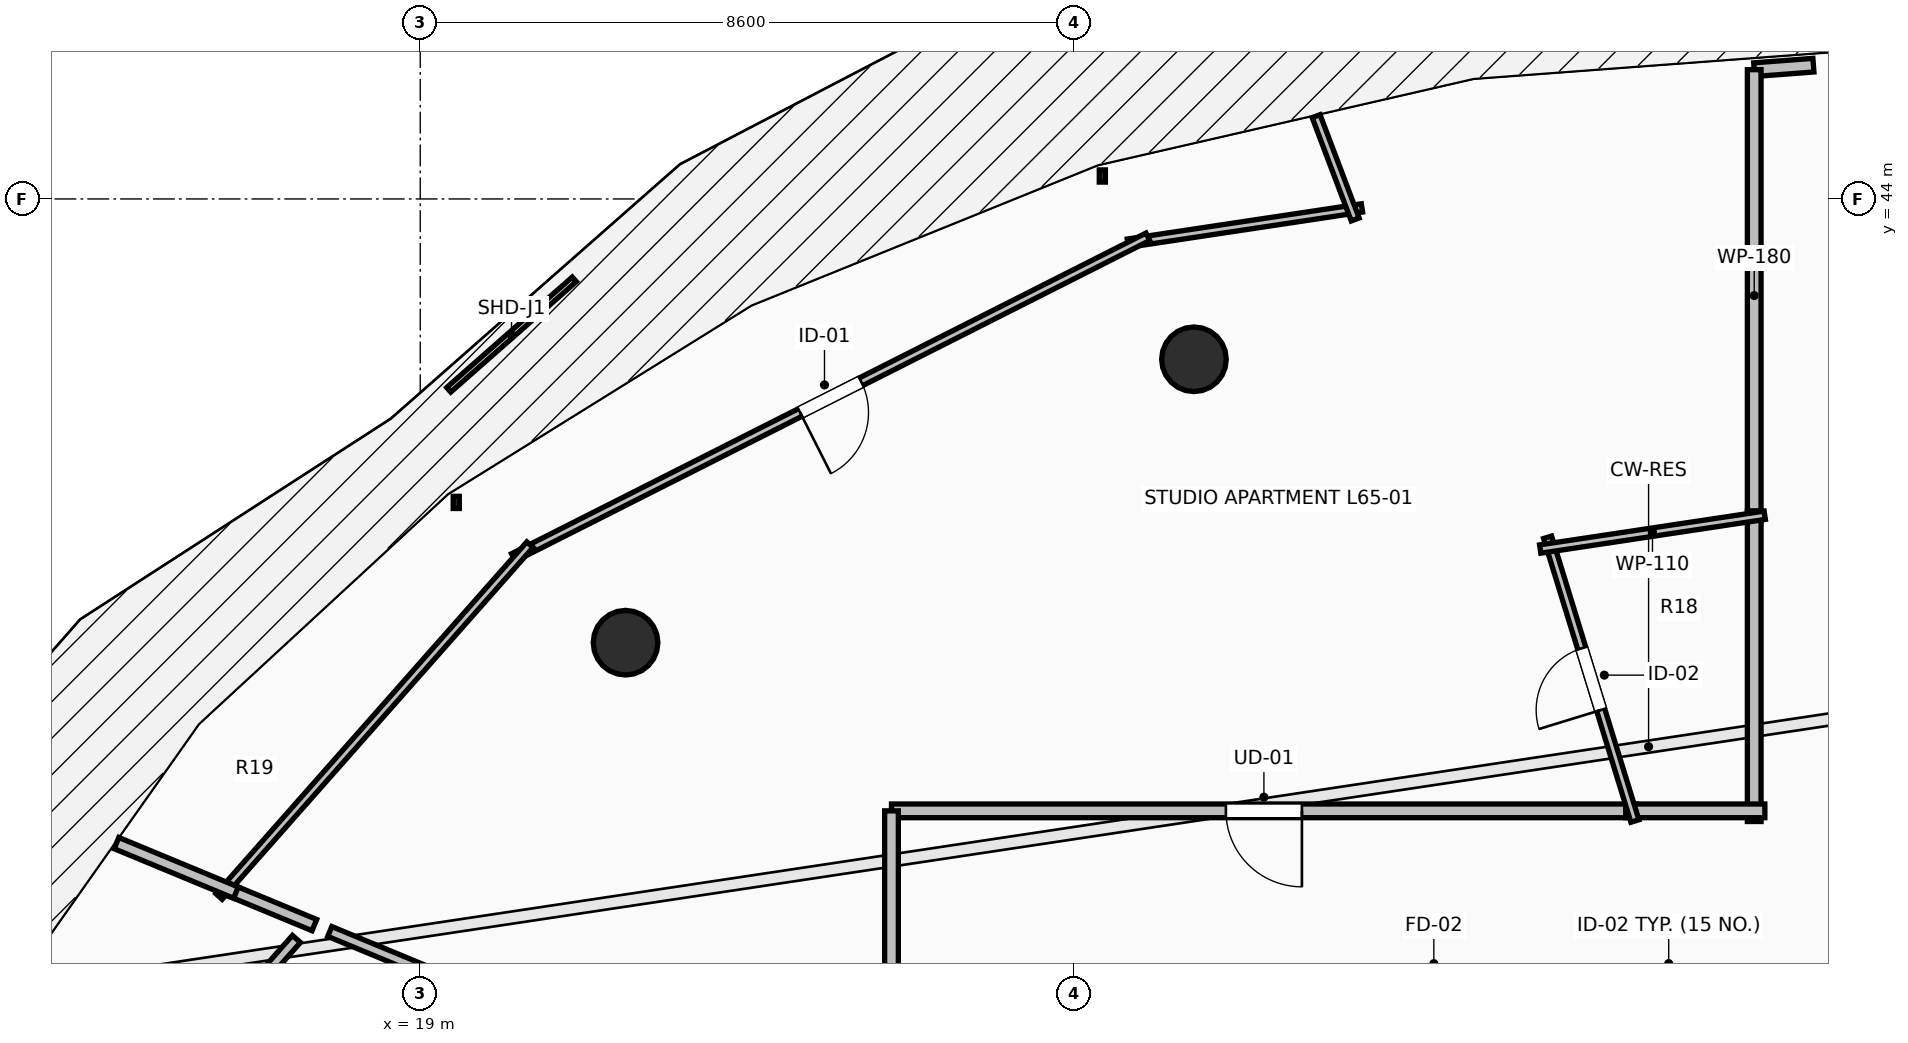
"""IFC4 building model, lengths in metres.
Left out: names, types, materials, properties, quantities, classifications, styles, units other than length and angle.
Written with IfcOpenShell. Run it as: python <this file> out.ifc"""

import sys

from ifc_helpers import new_model, si_unit, direction, frame, frame_2d, origin, origin_2d, place, context, subcontext, project, spatial, rectangle, circle, extrude, element, fill, save


model = new_model("IFC4")
c1 = context("Model", 3, precision=1e-05, world=origin(), true_north=direction((0.0, 1.0)))
c2 = subcontext(c1, "Body", "Model", "MODEL_VIEW")
j1 = project(units=[si_unit("LENGTHUNIT", "METRE"), si_unit("PLANEANGLEUNIT", "RADIAN")], contexts=[c1])
p1 = place(None, origin())
s1 = spatial("IfcSite", under=j1, at=p1, CompositionType="ELEMENT")
p2 = place(p1, origin())
s2 = spatial("IfcBuilding", under=s1, at=p2, CompositionType="ELEMENT")
p3 = place(p2, frame((0.0, 0.0, 241.35)))
s3 = spatial("IfcBuildingStorey", under=s2, at=p3, CompositionType="ELEMENT", Elevation=241.35)
for number, where, z_axis, x_axis in (
    (1, (29.179, 41.891, 0.0), (0.0, 0.0, 1.0), (-0.383, 0.924, 0.0)),
    (2, (21.701, 38.162, 0.0), (0.0, 0.0, 1.0), (-0.707, 0.707, 0.0)),
):
    element("IfcColumn", number, at=place(p3, frame(where, z_axis=z_axis, x_axis=x_axis)), inside=s3, PredefinedType="COLUMN", context=c2, shape_type="SweptSolid", body=[
        extrude(circle(Radius=0.425, at=origin_2d()), origin(), (0.0, 0.0, 1.0), 3.55),
    ])
p4 = place(p3, frame((37.329, 45.76, 0.0), z_axis=(0.0, 0.0, 1.0), x_axis=(-0.997136622012, -0.0756211415, 0.0)))
e3 = element("IfcWall", 3, at=p4, inside=s3, PredefinedType="PARTITIONING", context=c2, shape_type="SweptSolid", body=[
    extrude(rectangle(XDim=0.781, YDim=0.18, at=frame_2d((0.391, 0.0))), origin(), (0.0, 0.0, 1.0), 3.29),
])
p5 = place(p3, frame((36.55, 45.701, 0.0), z_axis=(0.0, 0.0, 1.0), x_axis=(0.0, -1.0, 0.0)))
e4 = element("IfcWall", 4, at=p5, inside=s3, PredefinedType="PARTITIONING", context=c2, shape_type="SweptSolid", body=[
    extrude(rectangle(XDim=5.944, YDim=0.18, at=frame_2d((2.972, 0.0))), origin(), (0.0, 0.0, 1.0), 2.482),
])
p6 = place(p3, frame((34.999, 35.95, 0.0), z_axis=(0.0, 0.0, 1.0), x_axis=(-1.0, 0.0, 0.0)))
e5 = element("IfcWall", 5, at=p6, inside=s3, PredefinedType="PARTITIONING", context=c2, shape_type="SweptSolid", body=[
    extrude(rectangle(XDim=9.799, YDim=0.18, at=frame_2d((4.899, 0.0))), origin(), (0.0, 0.0, 1.0), 2.482),
])
p7 = place(p6, frame((4.399, 0.0, 0.0)))
e6 = element("IfcOpeningElement", 6, at=p7, cuts=e5, PredefinedType="OPENING", context=c2, shape_type="SweptSolid", body=[
    extrude(rectangle(XDim=1.0, YDim=2.15, at=frame_2d((0.5, 1.075))), frame((0.0, 0.105, 0.0), z_axis=(0.0, -1.0, 0.0), x_axis=(1.0, 0.0, 0.0)), (0.0, 0.0, 1.0), 0.21),
])
p8 = place(p3, frame((25.2, 35.95, 0.0), z_axis=(0.0, 0.0, 1.0), x_axis=(0.0, -1.0, 0.0)))
e7 = element("IfcWall", 7, at=p8, inside=s3, PredefinedType="PARTITIONING", context=c2, shape_type="SweptSolid", body=[
    extrude(rectangle(XDim=4.708, YDim=0.18, at=frame_2d((2.354, 0.0))), origin(), (0.0, 0.0, 1.0), 2.482),
])
p9 = place(p3, frame((36.55, 39.897, 0.0), z_axis=(0.0, 0.0, 1.0), x_axis=(0.0, -1.0, 0.0)))
e8 = element("IfcWall", 8, at=p9, inside=s3, PredefinedType="PARTITIONING", context=c2, shape_type="SweptSolid", body=[
    extrude(rectangle(XDim=4.087, YDim=0.18, at=frame_2d((2.043, 0.0))), origin(), (0.0, 0.0, 1.0), 2.924),
])
p10 = place(p3, frame((36.69, 35.95, 0.0), z_axis=(0.0, 0.0, 1.0), x_axis=(-1.0, 0.0, 0.0)))
e9 = element("IfcWall", 9, at=p10, inside=s3, PredefinedType="PARTITIONING", context=c2, shape_type="SweptSolid", body=[
    extrude(rectangle(XDim=1.831, YDim=0.18, at=frame_2d((0.916, 0.0))), origin(), (0.0, 0.0, 1.0), 3.29),
])
p11 = place(p3, frame((34.98, 35.816, 0.0), z_axis=(0.0, 0.0, 1.0), x_axis=(-0.29406827714, 0.955784415221, 0.0)))
e10 = element("IfcWall", 10, at=p11, inside=s3, PredefinedType="PARTITIONING", context=c2, shape_type="SweptSolid", body=[
    extrude(rectangle(XDim=3.905, YDim=0.11, at=frame_2d((1.953, 0.0))), origin(), (0.0, 0.0, 1.0), 2.482),
])
p12 = place(p11, frame((1.528, 0.0, 0.0)))
e11 = element("IfcOpeningElement", 11, at=p12, cuts=e10, PredefinedType="OPENING", context=c2, shape_type="SweptSolid", body=[
    extrude(rectangle(XDim=0.85, YDim=2.1, at=frame_2d((0.425, 1.05))), frame((0.0, 0.07, 0.0), z_axis=(0.0, -1.0, 0.0), x_axis=(1.0, 0.0, 0.0)), (0.0, 0.0, 1.0), 0.14),
])
p13 = place(p3, frame((33.735, 39.394, 0.0), z_axis=(0.0, 0.0, 1.0), x_axis=(0.988862493006, 0.148832019156, 0.0)))
e12 = element("IfcWall", 12, at=p13, inside=s3, PredefinedType="PARTITIONING", context=c2, shape_type="SweptSolid", body=[
    extrude(rectangle(XDim=2.987, YDim=0.11, at=frame_2d((1.494, 0.0))), origin(), (0.0, 0.0, 1.0), 2.482),
])
p14 = place(p3, frame((31.389, 43.882, 0.0), z_axis=(0.0, 0.0, 1.0), x_axis=(-0.988858596585, -0.148857905265, 0.0)))
e13 = element("IfcWall", 13, at=p14, inside=s3, PredefinedType="PARTITIONING", context=c2, shape_type="SweptSolid", body=[
    extrude(rectangle(XDim=3.115, YDim=0.11, at=frame_2d((1.557, 0.0))), origin(), (0.0, 0.0, 1.0), 3.29),
])
p15 = place(p3, frame((28.573, 43.502, 0.0), z_axis=(0.0, 0.0, 1.0), x_axis=(-0.892502876412, -0.451041700507, 0.0)))
e14 = element("IfcWall", 14, at=p15, inside=s3, PredefinedType="PARTITIONING", context=c2, shape_type="SweptSolid", body=[
    extrude(rectangle(XDim=9.352, YDim=0.11, at=frame_2d((4.676, 0.0))), origin(), (0.0, 0.0, 1.0), 3.29),
])
p16 = place(p15, frame((4.226, 0.0, 0.0)))
e15 = element("IfcOpeningElement", 15, at=p16, cuts=e14, PredefinedType="OPENING", context=c2, shape_type="SweptSolid", body=[
    extrude(rectangle(XDim=0.9, YDim=2.1, at=frame_2d((0.45, 1.05))), frame((0.0, 0.07, 0.0), z_axis=(0.0, -1.0, 0.0), x_axis=(1.0, 0.0, 0.0)), (0.0, 0.0, 1.0), 0.14),
])
p17 = place(p3, frame((20.444, 39.452, 0.0), z_axis=(0.0, 0.0, 1.0), x_axis=(-0.662167862663, -0.749355537549, 0.0)))
e16 = element("IfcWall", 16, at=p17, inside=s3, PredefinedType="PARTITIONING", context=c2, shape_type="SweptSolid", body=[
    extrude(rectangle(XDim=6.177, YDim=0.11, at=frame_2d((3.089, 0.0))), origin(), (0.0, 0.0, 1.0), 3.29),
])
p18 = place(p3, frame((30.787, 45.089, 0.0), z_axis=(0.0, 0.0, 1.0), x_axis=(0.353737146492, -0.935344872863, 0.0)))
e17 = element("IfcWall", 17, at=p18, inside=s3, PredefinedType="PARTITIONING", context=c2, shape_type="SweptSolid", body=[
    extrude(rectangle(XDim=1.453, YDim=0.11, at=frame_2d((0.727, 0.0))), origin(), (0.0, 0.0, 1.0), 3.29),
])
p19 = place(p3, frame((16.446, 34.928, 0.0), z_axis=(0.0, 0.0, 1.0), x_axis=(0.923851056351, -0.382752172663, 0.0)))
e18 = element("IfcWall", 18, at=p19, inside=s3, PredefinedType="PARTITIONING", context=c2, shape_type="SweptSolid", body=[
    extrude(rectangle(XDim=1.257, YDim=0.16, at=frame_2d((0.628, 0.0))), origin(), (0.0, 0.0, 1.0), 3.29),
])
p20 = place(p3, frame((15.004, 35.526, 0.0), z_axis=(0.0, 0.0, 1.0), x_axis=(0.923843638485, -0.382770076719, 0.0)))
e19 = element("IfcWall", 19, at=p20, inside=s3, PredefinedType="PARTITIONING", context=c2, shape_type="SweptSolid", body=[
    extrude(rectangle(XDim=1.701, YDim=0.16, at=frame_2d((0.851, 0.0))), origin(), (0.0, 0.0, 1.0), 3.29),
])
p21 = place(p3, frame((17.81, 34.363, 0.0), z_axis=(0.0, 0.0, 1.0), x_axis=(0.923888322618, -0.382662210481, 0.0)))
e20 = element("IfcWall", 20, at=p21, inside=s3, PredefinedType="PARTITIONING", context=c2, shape_type="SweptSolid", body=[
    extrude(rectangle(XDim=1.829, YDim=0.14, at=frame_2d((0.915, 0.0))), origin(), (0.0, 0.0, 1.0), 2.874),
])
p22 = place(p3, frame((16.123, 32.853, 0.0), z_axis=(0.0, 0.0, 1.0), x_axis=(0.662302679983, 0.749236384652, 0.0)))
e21 = element("IfcWall", 21, at=p22, inside=s3, PredefinedType="PARTITIONING", context=c2, shape_type="SweptSolid", body=[
    extrude(rectangle(XDim=1.885, YDim=0.14, at=frame_2d((0.942, 0.0))), origin(), (0.0, 0.0, 1.0), 3.29),
])
p23 = place(p7, origin())
e22 = element("IfcDoor", 22, at=p23, inside=s3, OperationType="SINGLE_SWING_LEFT", PredefinedType="DOOR", context=c2, shape_type="SweptSolid", body=[
    extrude(rectangle(XDim=1.0, YDim=2.15, at=frame_2d((0.5, 1.075))), frame((0.0, 0.025, 0.0), z_axis=(0.0, -1.0, 0.0), x_axis=(1.0, 0.0, 0.0)), (0.0, 0.0, 1.0), 0.05),
])
fill(e6, e22)
p24 = place(p12, origin())
e23 = element("IfcDoor", 23, at=p24, inside=s3, OperationType="SINGLE_SWING_LEFT", PredefinedType="DOOR", context=c2, shape_type="SweptSolid", body=[
    extrude(rectangle(XDim=0.85, YDim=2.1, at=frame_2d((0.425, 1.05))), frame((0.0, 0.025, 0.0), z_axis=(0.0, -1.0, 0.0), x_axis=(1.0, 0.0, 0.0)), (0.0, 0.0, 1.0), 0.05),
])
fill(e11, e23)
p25 = place(p16, origin())
e24 = element("IfcDoor", 24, at=p25, inside=s3, OperationType="SINGLE_SWING_RIGHT", PredefinedType="DOOR", context=c2, shape_type="SweptSolid", body=[
    extrude(rectangle(XDim=0.9, YDim=2.1, at=frame_2d((0.45, 1.05))), frame((0.0, 0.025, 0.0), z_axis=(0.0, -1.0, 0.0), x_axis=(1.0, 0.0, 0.0)), (0.0, 0.0, 1.0), 0.05),
])
fill(e15, e24)
save(model, sys.argv[1])
